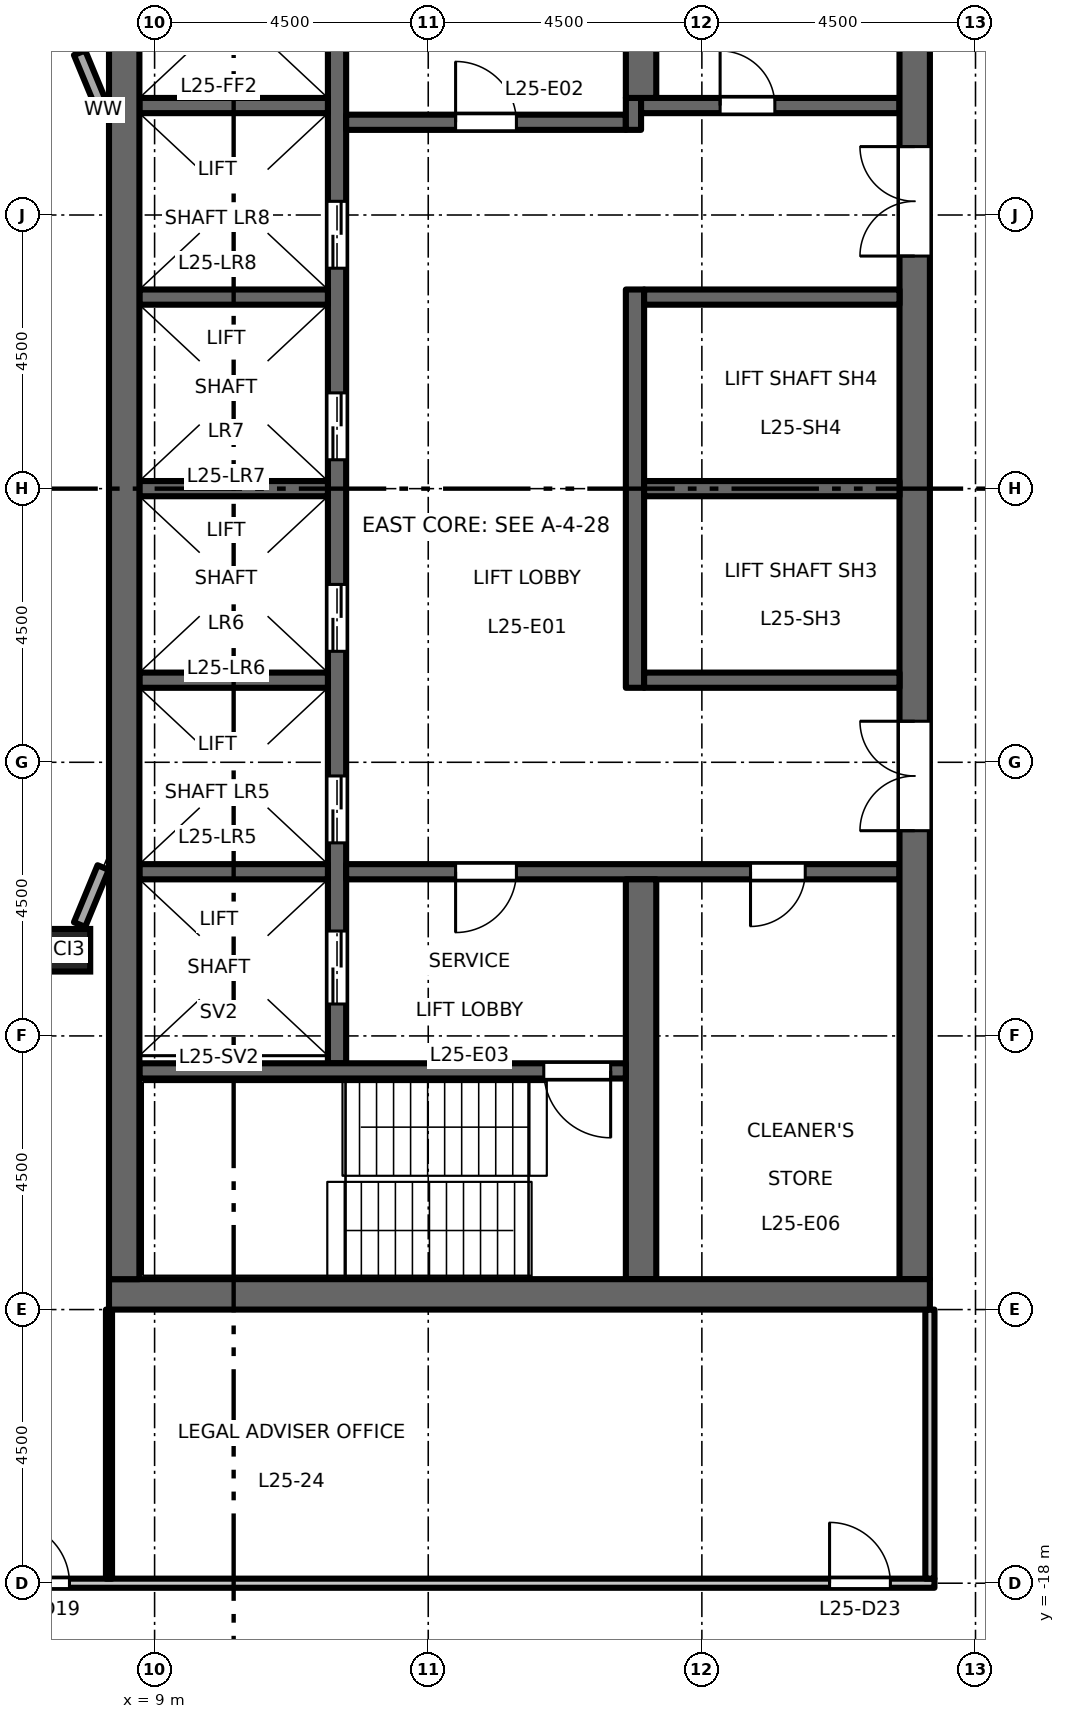
"""IFC4 building model, lengths in metres.
Left out: names, types, materials, properties, quantities, classifications, styles, units other than length and angle.
Written with IfcOpenShell. Run it as: python <this file> out.ifc"""

import sys

from ifc_helpers import new_model, si_unit, direction, frame, frame_2d, origin, origin_2d, place, context, subcontext, project, spatial, rectangle, hollow_rectangle, extrude, element, fill, save


model = new_model("IFC4")
c1 = context("Model", 3, precision=1e-05, world=origin(), true_north=direction((0.0, 1.0)))
c2 = subcontext(c1, "Body", "Model", "MODEL_VIEW")
j1 = project(units=[si_unit("LENGTHUNIT", "METRE"), si_unit("PLANEANGLEUNIT", "RADIAN")], contexts=[c1])
p1 = place(None, origin())
s1 = spatial("IfcSite", under=j1, at=p1, CompositionType="ELEMENT")
p2 = place(p1, origin())
s2 = spatial("IfcBuilding", under=s1, at=p2, CompositionType="ELEMENT")
p3 = place(p2, frame((0.0, 0.0, 118.2)))
s3 = spatial("IfcBuildingStorey", under=s2, at=p3, CompositionType="ELEMENT", Elevation=118.2)
p4 = place(p3, frame((7.591, -7.591, 0.0), z_axis=(0.0, 0.0, 1.0), x_axis=(1.0, 0.0, 0.0)))
e1 = element("IfcColumn", 1, at=p4, inside=s3, PredefinedType="COLUMN", context=c2, shape_type="SweptSolid", body=[
    extrude(hollow_rectangle(XDim=0.7, YDim=0.7, WallThickness=0.04, at=origin_2d()), origin(), (0.0, 0.0, 1.0), 4.5),
])
p5 = place(p3, frame((12.0, -9.45, 0.0), z_axis=(0.0, 0.0, 1.0), x_axis=(0.0, 1.0, 0.0)))
e2 = element("IfcWall", 2, at=p5, inside=s3, PredefinedType="SHEAR", context=c2, shape_type="SweptSolid", body=[
    extrude(rectangle(XDim=18.9, YDim=0.3, at=frame_2d((9.45, 0.0))), origin(), (0.0, 0.0, 1.0), 4.35),
])
p6 = place(p5, frame((3.625, 0.0, 0.0)))
e3 = element("IfcOpeningElement", 3, at=p6, cuts=e2, PredefinedType="OPENING", context=c2, shape_type="SweptSolid", body=[
    extrude(rectangle(XDim=1.1, YDim=2.1, at=frame_2d((0.55, 1.05))), frame((0.0, 0.16, 0.0), z_axis=(0.0, -1.0, 0.0), x_axis=(1.0, 0.0, 0.0)), (0.0, 0.0, 1.0), 0.32),
])
p7 = place(p5, frame((6.775, 0.0, 0.0)))
e4 = element("IfcOpeningElement", 4, at=p7, cuts=e2, PredefinedType="OPENING", context=c2, shape_type="SweptSolid", body=[
    extrude(rectangle(XDim=1.1, YDim=2.1, at=frame_2d((0.55, 1.05))), frame((0.0, 0.16, 0.0), z_axis=(0.0, -1.0, 0.0), x_axis=(1.0, 0.0, 0.0)), (0.0, 0.0, 1.0), 0.32),
])
p8 = place(p5, frame((9.925, 0.0, 0.0)))
e5 = element("IfcOpeningElement", 5, at=p8, cuts=e2, PredefinedType="OPENING", context=c2, shape_type="SweptSolid", body=[
    extrude(rectangle(XDim=1.1, YDim=2.1, at=frame_2d((0.55, 1.05))), frame((0.0, 0.16, 0.0), z_axis=(0.0, -1.0, 0.0), x_axis=(1.0, 0.0, 0.0)), (0.0, 0.0, 1.0), 0.32),
])
p9 = place(p5, frame((13.075, 0.0, 0.0)))
e6 = element("IfcOpeningElement", 6, at=p9, cuts=e2, PredefinedType="OPENING", context=c2, shape_type="SweptSolid", body=[
    extrude(rectangle(XDim=1.1, YDim=2.1, at=frame_2d((0.55, 1.05))), frame((0.0, 0.16, 0.0), z_axis=(0.0, -1.0, 0.0), x_axis=(1.0, 0.0, 0.0)), (0.0, 0.0, 1.0), 0.32),
])
p10 = place(p5, frame((16.725, 0.0, 0.0)))
e7 = element("IfcOpeningElement", 7, at=p10, cuts=e2, PredefinedType="OPENING", context=c2, shape_type="SweptSolid", body=[
    extrude(rectangle(XDim=1.2, YDim=2.1, at=frame_2d((0.6, 1.05))), frame((0.0, 0.16, 0.0), z_axis=(0.0, -1.0, 0.0), x_axis=(1.0, 0.0, 0.0)), (0.0, 0.0, 1.0), 0.32),
])
p11 = place(p5, frame((0.975, 0.0, 0.0)))
e8 = element("IfcOpeningElement", 8, at=p11, cuts=e2, PredefinedType="OPENING", context=c2, shape_type="SweptSolid", body=[
    extrude(rectangle(XDim=1.2, YDim=2.1, at=frame_2d((0.6, 1.05))), frame((0.0, 0.16, 0.0), z_axis=(0.0, -1.0, 0.0), x_axis=(1.0, 0.0, 0.0)), (0.0, 0.0, 1.0), 0.32),
])
p12 = place(p3, frame((12.15, 6.025, 0.0), z_axis=(0.0, 0.0, 1.0), x_axis=(1.0, 0.0, 0.0)))
e9 = element("IfcWall", 9, at=p12, inside=s3, PredefinedType="SHEAR", context=c2, shape_type="SweptSolid", body=[
    extrude(rectangle(XDim=4.6, YDim=0.25, at=frame_2d((2.3, 0.0))), origin(), (0.0, 0.0, 1.0), 4.35),
])
p13 = place(p12, frame((1.8, 0.0, 0.0)))
e10 = element("IfcOpeningElement", 10, at=p13, cuts=e9, PredefinedType="OPENING", context=c2, shape_type="SweptSolid", body=[
    extrude(rectangle(XDim=1.0, YDim=2.1, at=frame_2d((0.5, 1.05))), frame((0.0, 0.135, 0.0), z_axis=(0.0, -1.0, 0.0), x_axis=(1.0, 0.0, 0.0)), (0.0, 0.0, 1.0), 0.27),
])
p14 = place(p3, frame((16.875, 5.9, 0.0), z_axis=(0.0, 0.0, 1.0), x_axis=(0.0, 1.0, 0.0)))
e11 = element("IfcWall", 11, at=p14, inside=s3, PredefinedType="SHEAR", context=c2, shape_type="SweptSolid", body=[
    extrude(rectangle(XDim=0.525, YDim=0.25, at=frame_2d((0.263, 0.0))), origin(), (0.0, 0.0, 1.0), 4.35),
])
p15 = place(p3, frame((17.0, 6.3, 0.0), z_axis=(0.0, 0.0, 1.0), x_axis=(1.0, 0.0, 0.0)))
e12 = element("IfcWall", 12, at=p15, inside=s3, PredefinedType="SHEAR", context=c2, shape_type="SweptSolid", body=[
    extrude(rectangle(XDim=4.25, YDim=0.25, at=frame_2d((2.125, 0.0))), origin(), (0.0, 0.0, 1.0), 4.35),
])
p16 = place(p15, frame((1.3, 0.0, 0.0)))
e13 = element("IfcOpeningElement", 13, at=p16, cuts=e12, PredefinedType="OPENING", context=c2, shape_type="SweptSolid", body=[
    extrude(rectangle(XDim=0.9, YDim=2.1, at=frame_2d((0.45, 1.05))), frame((0.0, 0.135, 0.0), z_axis=(0.0, -1.0, 0.0), x_axis=(1.0, 0.0, 0.0)), (0.0, 0.0, 1.0), 0.27),
])
p17 = place(p3, frame((12.15, -6.3, 0.0), z_axis=(0.0, 0.0, 1.0), x_axis=(1.0, 0.0, 0.0)))
e14 = element("IfcWall", 14, at=p17, inside=s3, PredefinedType="SHEAR", context=c2, shape_type="SweptSolid", body=[
    extrude(rectangle(XDim=9.1, YDim=0.25, at=frame_2d((4.55, 0.0))), origin(), (0.0, 0.0, 1.0), 4.35),
])
p18 = place(p17, frame((1.8, 0.0, 0.0)))
e15 = element("IfcOpeningElement", 15, at=p18, cuts=e14, PredefinedType="OPENING", context=c2, shape_type="SweptSolid", body=[
    extrude(rectangle(XDim=1.0, YDim=2.1, at=frame_2d((0.5, 1.05))), frame((0.0, 0.135, 0.0), z_axis=(0.0, -1.0, 0.0), x_axis=(1.0, 0.0, 0.0)), (0.0, 0.0, 1.0), 0.27),
])
p19 = place(p17, frame((6.65, 0.0, 0.0)))
e16 = element("IfcOpeningElement", 16, at=p19, cuts=e14, PredefinedType="OPENING", context=c2, shape_type="SweptSolid", body=[
    extrude(rectangle(XDim=0.9, YDim=2.1, at=frame_2d((0.45, 1.05))), frame((0.0, 0.135, 0.0), z_axis=(0.0, -1.0, 0.0), x_axis=(1.0, 0.0, 0.0)), (0.0, 0.0, 1.0), 0.27),
])
p20 = place(p3, frame((21.5, -13.0, 0.0), z_axis=(0.0, 0.0, 1.0), x_axis=(0.0, 1.0, 0.0)))
e17 = element("IfcWall", 17, at=p20, inside=s3, PredefinedType="SHEAR", context=c2, shape_type="SweptSolid", body=[
    extrude(rectangle(XDim=26.0, YDim=0.5, at=frame_2d((13.0, 0.0))), origin(), (0.0, 0.0, 1.0), 4.35),
])
p21 = place(p20, frame((16.825, 0.0, 0.0)))
e18 = element("IfcOpeningElement", 18, at=p21, cuts=e17, PredefinedType="OPENING", context=c2, shape_type="SweptSolid", body=[
    extrude(rectangle(XDim=1.8, YDim=2.1, at=frame_2d((0.9, 1.05))), frame((0.0, 0.26, 0.0), z_axis=(0.0, -1.0, 0.0), x_axis=(1.0, 0.0, 0.0)), (0.0, 0.0, 1.0), 0.52),
])
p22 = place(p20, frame((7.375, 0.0, 0.0)))
e19 = element("IfcOpeningElement", 19, at=p22, cuts=e17, PredefinedType="OPENING", context=c2, shape_type="SweptSolid", body=[
    extrude(rectangle(XDim=1.8, YDim=2.1, at=frame_2d((0.9, 1.05))), frame((0.0, 0.26, 0.0), z_axis=(0.0, -1.0, 0.0), x_axis=(1.0, 0.0, 0.0)), (0.0, 0.0, 1.0), 0.52),
])
p23 = place(p20, frame((23.4, 0.0, 0.0)))
e20 = element("IfcOpeningElement", 20, at=p23, cuts=e17, PredefinedType="OPENING", context=c2, shape_type="SweptSolid", body=[
    extrude(rectangle(XDim=0.9, YDim=2.1, at=frame_2d((0.45, 1.05))), frame((0.0, 0.26, 0.0), z_axis=(0.0, -1.0, 0.0), x_axis=(1.0, 0.0, 0.0)), (0.0, 0.0, 1.0), 0.52),
])
p24 = place(p3, frame((16.9, -3.275, 0.0), z_axis=(0.0, 0.0, 1.0), x_axis=(0.0, 1.0, 0.0)))
e21 = element("IfcWall", 21, at=p24, inside=s3, PredefinedType="SHEAR", context=c2, shape_type="SweptSolid", body=[
    extrude(rectangle(XDim=6.55, YDim=0.3, at=frame_2d((3.275, 0.0))), origin(), (0.0, 0.0, 1.0), 4.35),
])
for number, where, z_axis, x_axis in (
    (22, (17.05, 0.0, 0.0), (0.0, 0.0, 1.0), (1.0, 0.0, 0.0)),
    (23, (17.05, 3.15, 0.0), (0.0, 0.0, 1.0), (1.0, 0.0, 0.0)),
    (24, (17.05, -3.15, 0.0), (0.0, 0.0, 1.0), (1.0, 0.0, 0.0)),
):
    element("IfcWall", number, at=place(p3, frame(where, z_axis=z_axis, x_axis=x_axis)), inside=s3, PredefinedType="SHEAR", context=c2, shape_type="SweptSolid", body=[
        extrude(rectangle(XDim=4.2, YDim=0.25, at=frame_2d((2.1, 0.0))), origin(), (0.0, 0.0, 1.0), 4.35),
    ])
for number, where, z_axis, x_axis in (
    (25, (17.0, 6.425, 0.0), (0.0, 0.0, 1.0), (0.0, 1.0, 0.0)),
    (26, (17.0, -13.0, 0.0), (0.0, 0.0, 1.0), (0.0, 1.0, 0.0)),
):
    element("IfcWall", number, at=place(p3, frame(where, z_axis=z_axis, x_axis=x_axis)), inside=s3, PredefinedType="SHEAR", context=c2, shape_type="SweptSolid", body=[
        extrude(rectangle(XDim=6.575, YDim=0.5, at=frame_2d((3.288, 0.0))), origin(), (0.0, 0.0, 1.0), 4.35),
    ])
for number, where, z_axis, x_axis in (
    (27, (8.75, 0.0, 0.0), (0.0, 0.0, 1.0), (1.0, 0.0, 0.0)),
    (28, (8.75, 3.15, 0.0), (0.0, 0.0, 1.0), (1.0, 0.0, 0.0)),
    (29, (8.75, 6.3, 0.0), (0.0, 0.0, 1.0), (1.0, 0.0, 0.0)),
    (30, (8.75, -3.15, 0.0), (0.0, 0.0, 1.0), (1.0, 0.0, 0.0)),
    (31, (8.75, -6.3, 0.0), (0.0, 0.0, 1.0), (1.0, 0.0, 0.0)),
):
    element("IfcWall", number, at=place(p3, frame(where, z_axis=z_axis, x_axis=x_axis)), inside=s3, PredefinedType="SHEAR", context=c2, shape_type="SweptSolid", body=[
        extrude(rectangle(XDim=3.1, YDim=0.25, at=frame_2d((1.55, 0.0))), origin(), (0.0, 0.0, 1.0), 4.35),
    ])
p25 = place(p3, frame((8.75, -9.575, 0.0), z_axis=(0.0, 0.0, 1.0), x_axis=(1.0, 0.0, 0.0)))
e32 = element("IfcWall", 32, at=p25, inside=s3, PredefinedType="SHEAR", context=c2, shape_type="SweptSolid", body=[
    extrude(rectangle(XDim=8.0, YDim=0.25, at=frame_2d((4.0, 0.0))), origin(), (0.0, 0.0, 1.0), 4.35),
])
p26 = place(p25, frame((6.65, 0.0, 0.0)))
e33 = element("IfcOpeningElement", 33, at=p26, cuts=e32, PredefinedType="OPENING", context=c2, shape_type="SweptSolid", body=[
    extrude(rectangle(XDim=1.1, YDim=2.1, at=frame_2d((0.55, 1.05))), frame((0.0, 0.135, 0.0), z_axis=(0.0, -1.0, 0.0), x_axis=(1.0, 0.0, 0.0)), (0.0, 0.0, 1.0), 0.27),
])
p27 = place(p3, frame((8.25, -13.25, 0.0), z_axis=(0.0, 0.0, 1.0), x_axis=(1.0, 0.0, 0.0)))
e34 = element("IfcWall", 34, at=p27, inside=s3, PredefinedType="SHEAR", context=c2, shape_type="SweptSolid", body=[
    extrude(rectangle(XDim=13.5, YDim=0.5, at=frame_2d((6.75, 0.0))), origin(), (0.0, 0.0, 1.0), 4.35),
])
p28 = place(p3, frame((8.5, -13.0, 0.0), z_axis=(0.0, 0.0, 1.0), x_axis=(0.0, 1.0, 0.0)))
e35 = element("IfcWall", 35, at=p28, inside=s3, PredefinedType="SHEAR", context=c2, shape_type="SweptSolid", body=[
    extrude(rectangle(XDim=26.0, YDim=0.5, at=frame_2d((13.0, 0.0))), origin(), (0.0, 0.0, 1.0), 4.35),
])
for number, where, z_axis, x_axis in (
    (36, (7.766, -7.168, 0.0), (0.0, 0.0, 1.0), (0.383, 0.924, 0.0)),
    (37, (8.154, 6.231, 0.0), (0.0, 0.0, 1.0), (-0.383, 0.924, 0.0)),
):
    element("IfcWall", number, at=place(p3, frame(where, z_axis=z_axis, x_axis=x_axis)), inside=s3, PredefinedType="STANDARD", context=c2, shape_type="SweptSolid", body=[
        extrude(rectangle(XDim=1.015, YDim=0.2, at=frame_2d((0.507, 0.0))), origin(), (0.0, 0.0, 1.0), 3.826),
    ])
p29 = place(p3, frame((-21.825, -18.0, 0.0), z_axis=(0.0, 0.0, 1.0), x_axis=(1.0, 0.0, 0.0)))
e38 = element("IfcWall", 38, at=p29, inside=s3, PredefinedType="PARTITIONING", context=c2, shape_type="SweptSolid", body=[
    extrude(rectangle(XDim=43.65, YDim=0.15, at=frame_2d((21.825, 0.0))), origin(), (0.0, 0.0, 1.0), 4.35),
])
p30 = place(p29, frame((14.175, 0.0, 0.0)))
e39 = element("IfcOpeningElement", 39, at=p30, cuts=e38, PredefinedType="OPENING", context=c2, shape_type="SweptSolid", body=[
    extrude(rectangle(XDim=1.0, YDim=2.1, at=frame_2d((0.5, 1.05))), frame((0.0, 0.085, 0.0), z_axis=(0.0, -1.0, 0.0), x_axis=(1.0, 0.0, 0.0)), (0.0, 0.0, 1.0), 0.17),
])
p31 = place(p29, frame((28.425, 0.0, 0.0)))
e40 = element("IfcOpeningElement", 40, at=p31, cuts=e38, PredefinedType="OPENING", context=c2, shape_type="SweptSolid", body=[
    extrude(rectangle(XDim=1.0, YDim=2.1, at=frame_2d((0.5, 1.05))), frame((0.0, 0.085, 0.0), z_axis=(0.0, -1.0, 0.0), x_axis=(1.0, 0.0, 0.0)), (0.0, 0.0, 1.0), 0.17),
])
p32 = place(p29, frame((0.675, 0.0, 0.0)))
e41 = element("IfcOpeningElement", 41, at=p32, cuts=e38, PredefinedType="OPENING", context=c2, shape_type="SweptSolid", body=[
    extrude(rectangle(XDim=1.0, YDim=2.1, at=frame_2d((0.5, 1.05))), frame((0.0, 0.085, 0.0), z_axis=(0.0, -1.0, 0.0), x_axis=(1.0, 0.0, 0.0)), (0.0, 0.0, 1.0), 0.17),
])
p33 = place(p29, frame((41.925, 0.0, 0.0)))
e42 = element("IfcOpeningElement", 42, at=p33, cuts=e38, PredefinedType="OPENING", context=c2, shape_type="SweptSolid", body=[
    extrude(rectangle(XDim=1.0, YDim=2.1, at=frame_2d((0.5, 1.05))), frame((0.0, 0.085, 0.0), z_axis=(0.0, -1.0, 0.0), x_axis=(1.0, 0.0, 0.0)), (0.0, 0.0, 1.0), 0.17),
])
p34 = place(p3, frame((8.25, -17.925, 0.0), z_axis=(0.0, 0.0, 1.0), x_axis=(0.0, 1.0, 0.0)))
e43 = element("IfcWall", 43, at=p34, inside=s3, PredefinedType="PARTITIONING", context=c2, shape_type="SweptSolid", body=[
    extrude(rectangle(XDim=4.425, YDim=0.1, at=frame_2d((2.212, 0.0))), origin(), (0.0, 0.0, 1.0), 4.35),
])
p35 = place(p3, frame((21.75, -17.925, 0.0), z_axis=(0.0, 0.0, 1.0), x_axis=(0.0, 1.0, 0.0)))
e44 = element("IfcWall", 44, at=p35, inside=s3, PredefinedType="PARTITIONING", context=c2, shape_type="SweptSolid", body=[
    extrude(rectangle(XDim=4.425, YDim=0.15, at=frame_2d((2.212, 0.0))), origin(), (0.0, 0.0, 1.0), 4.35),
])
p36 = place(p13, origin())
e45 = element("IfcDoor", 45, at=p36, inside=s3, OperationType="SINGLE_SWING_RIGHT", PredefinedType="DOOR", context=c2, shape_type="SweptSolid", body=[
    extrude(rectangle(XDim=1.0, YDim=2.1, at=frame_2d((0.5, 1.05))), frame((0.0, 0.025, 0.0), z_axis=(0.0, -1.0, 0.0), x_axis=(1.0, 0.0, 0.0)), (0.0, 0.0, 1.0), 0.05),
])
fill(e10, e45)
p37 = place(p18, origin())
e46 = element("IfcDoor", 46, at=p37, inside=s3, OperationType="SINGLE_SWING_LEFT", PredefinedType="DOOR", context=c2, shape_type="SweptSolid", body=[
    extrude(rectangle(XDim=1.0, YDim=2.1, at=frame_2d((0.5, 1.05))), frame((0.0, 0.025, 0.0), z_axis=(0.0, -1.0, 0.0), x_axis=(1.0, 0.0, 0.0)), (0.0, 0.0, 1.0), 0.05),
])
fill(e15, e46)
p38 = place(p26, origin())
e47 = element("IfcDoor", 47, at=p38, inside=s3, OperationType="SINGLE_SWING_RIGHT", PredefinedType="DOOR", context=c2, shape_type="SweptSolid", body=[
    extrude(rectangle(XDim=1.1, YDim=2.1, at=frame_2d((0.55, 1.05))), frame((0.0, 0.025, 0.0), z_axis=(0.0, -1.0, 0.0), x_axis=(1.0, 0.0, 0.0)), (0.0, 0.0, 1.0), 0.05),
])
fill(e33, e47)
p39 = place(p21, origin())
e48 = element("IfcDoor", 48, at=p39, inside=s3, OperationType="DOUBLE_DOOR_DOUBLE_SWING", PredefinedType="DOOR", context=c2, shape_type="SweptSolid", body=[
    extrude(rectangle(XDim=1.8, YDim=2.1, at=frame_2d((0.9, 1.05))), frame((0.0, 0.025, 0.0), z_axis=(0.0, -1.0, 0.0), x_axis=(1.0, 0.0, 0.0)), (0.0, 0.0, 1.0), 0.05),
])
fill(e18, e48)
p40 = place(p22, origin())
e49 = element("IfcDoor", 49, at=p40, inside=s3, OperationType="DOUBLE_DOOR_DOUBLE_SWING", PredefinedType="DOOR", context=c2, shape_type="SweptSolid", body=[
    extrude(rectangle(XDim=1.8, YDim=2.1, at=frame_2d((0.9, 1.05))), frame((0.0, 0.025, 0.0), z_axis=(0.0, -1.0, 0.0), x_axis=(1.0, 0.0, 0.0)), (0.0, 0.0, 1.0), 0.05),
])
fill(e19, e49)
p41 = place(p6, origin())
e50 = element("IfcDoor", 50, at=p41, inside=s3, OperationType="DOUBLE_DOOR_SLIDING", PredefinedType="DOOR", context=c2, shape_type="SweptSolid", body=[
    extrude(rectangle(XDim=1.1, YDim=2.1, at=frame_2d((0.55, 1.05))), frame((0.0, 0.025, 0.0), z_axis=(0.0, -1.0, 0.0), x_axis=(1.0, 0.0, 0.0)), (0.0, 0.0, 1.0), 0.05),
])
fill(e3, e50)
p42 = place(p7, origin())
e51 = element("IfcDoor", 51, at=p42, inside=s3, OperationType="DOUBLE_DOOR_SLIDING", PredefinedType="DOOR", context=c2, shape_type="SweptSolid", body=[
    extrude(rectangle(XDim=1.1, YDim=2.1, at=frame_2d((0.55, 1.05))), frame((0.0, 0.025, 0.0), z_axis=(0.0, -1.0, 0.0), x_axis=(1.0, 0.0, 0.0)), (0.0, 0.0, 1.0), 0.05),
])
fill(e4, e51)
p43 = place(p8, origin())
e52 = element("IfcDoor", 52, at=p43, inside=s3, OperationType="DOUBLE_DOOR_SLIDING", PredefinedType="DOOR", context=c2, shape_type="SweptSolid", body=[
    extrude(rectangle(XDim=1.1, YDim=2.1, at=frame_2d((0.55, 1.05))), frame((0.0, 0.025, 0.0), z_axis=(0.0, -1.0, 0.0), x_axis=(1.0, 0.0, 0.0)), (0.0, 0.0, 1.0), 0.05),
])
fill(e5, e52)
p44 = place(p9, origin())
e53 = element("IfcDoor", 53, at=p44, inside=s3, OperationType="DOUBLE_DOOR_SLIDING", PredefinedType="DOOR", context=c2, shape_type="SweptSolid", body=[
    extrude(rectangle(XDim=1.1, YDim=2.1, at=frame_2d((0.55, 1.05))), frame((0.0, 0.025, 0.0), z_axis=(0.0, -1.0, 0.0), x_axis=(1.0, 0.0, 0.0)), (0.0, 0.0, 1.0), 0.05),
])
fill(e6, e53)
p45 = place(p11, origin())
e54 = element("IfcDoor", 54, at=p45, inside=s3, OperationType="DOUBLE_DOOR_SLIDING", PredefinedType="DOOR", context=c2, shape_type="SweptSolid", body=[
    extrude(rectangle(XDim=1.2, YDim=2.1, at=frame_2d((0.6, 1.05))), frame((0.0, 0.025, 0.0), z_axis=(0.0, -1.0, 0.0), x_axis=(1.0, 0.0, 0.0)), (0.0, 0.0, 1.0), 0.05),
])
fill(e8, e54)
p46 = place(p16, origin())
e55 = element("IfcDoor", 55, at=p46, inside=s3, OperationType="SINGLE_SWING_RIGHT", PredefinedType="DOOR", context=c2, shape_type="SweptSolid", body=[
    extrude(rectangle(XDim=0.9, YDim=2.1, at=frame_2d((0.45, 1.05))), frame((0.0, 0.025, 0.0), z_axis=(0.0, -1.0, 0.0), x_axis=(1.0, 0.0, 0.0)), (0.0, 0.0, 1.0), 0.05),
])
fill(e13, e55)
p47 = place(p19, origin())
e56 = element("IfcDoor", 56, at=p47, inside=s3, OperationType="SINGLE_SWING_LEFT", PredefinedType="DOOR", context=c2, shape_type="SweptSolid", body=[
    extrude(rectangle(XDim=0.9, YDim=2.1, at=frame_2d((0.45, 1.05))), frame((0.0, 0.025, 0.0), z_axis=(0.0, -1.0, 0.0), x_axis=(1.0, 0.0, 0.0)), (0.0, 0.0, 1.0), 0.05),
])
fill(e16, e56)
p48 = place(p31, origin())
e57 = element("IfcDoor", 57, at=p48, inside=s3, OperationType="SINGLE_SWING_LEFT", PredefinedType="DOOR", context=c2, shape_type="SweptSolid", body=[
    extrude(rectangle(XDim=1.0, YDim=2.1, at=frame_2d((0.5, 1.05))), frame((0.0, 0.025, 0.0), z_axis=(0.0, -1.0, 0.0), x_axis=(1.0, 0.0, 0.0)), (0.0, 0.0, 1.0), 0.05),
])
fill(e40, e57)
p49 = place(p33, origin())
e58 = element("IfcDoor", 58, at=p49, inside=s3, OperationType="SINGLE_SWING_LEFT", PredefinedType="DOOR", context=c2, shape_type="SweptSolid", body=[
    extrude(rectangle(XDim=1.0, YDim=2.1, at=frame_2d((0.5, 1.05))), frame((0.0, 0.025, 0.0), z_axis=(0.0, -1.0, 0.0), x_axis=(1.0, 0.0, 0.0)), (0.0, 0.0, 1.0), 0.05),
])
fill(e42, e58)
save(model, sys.argv[1])
